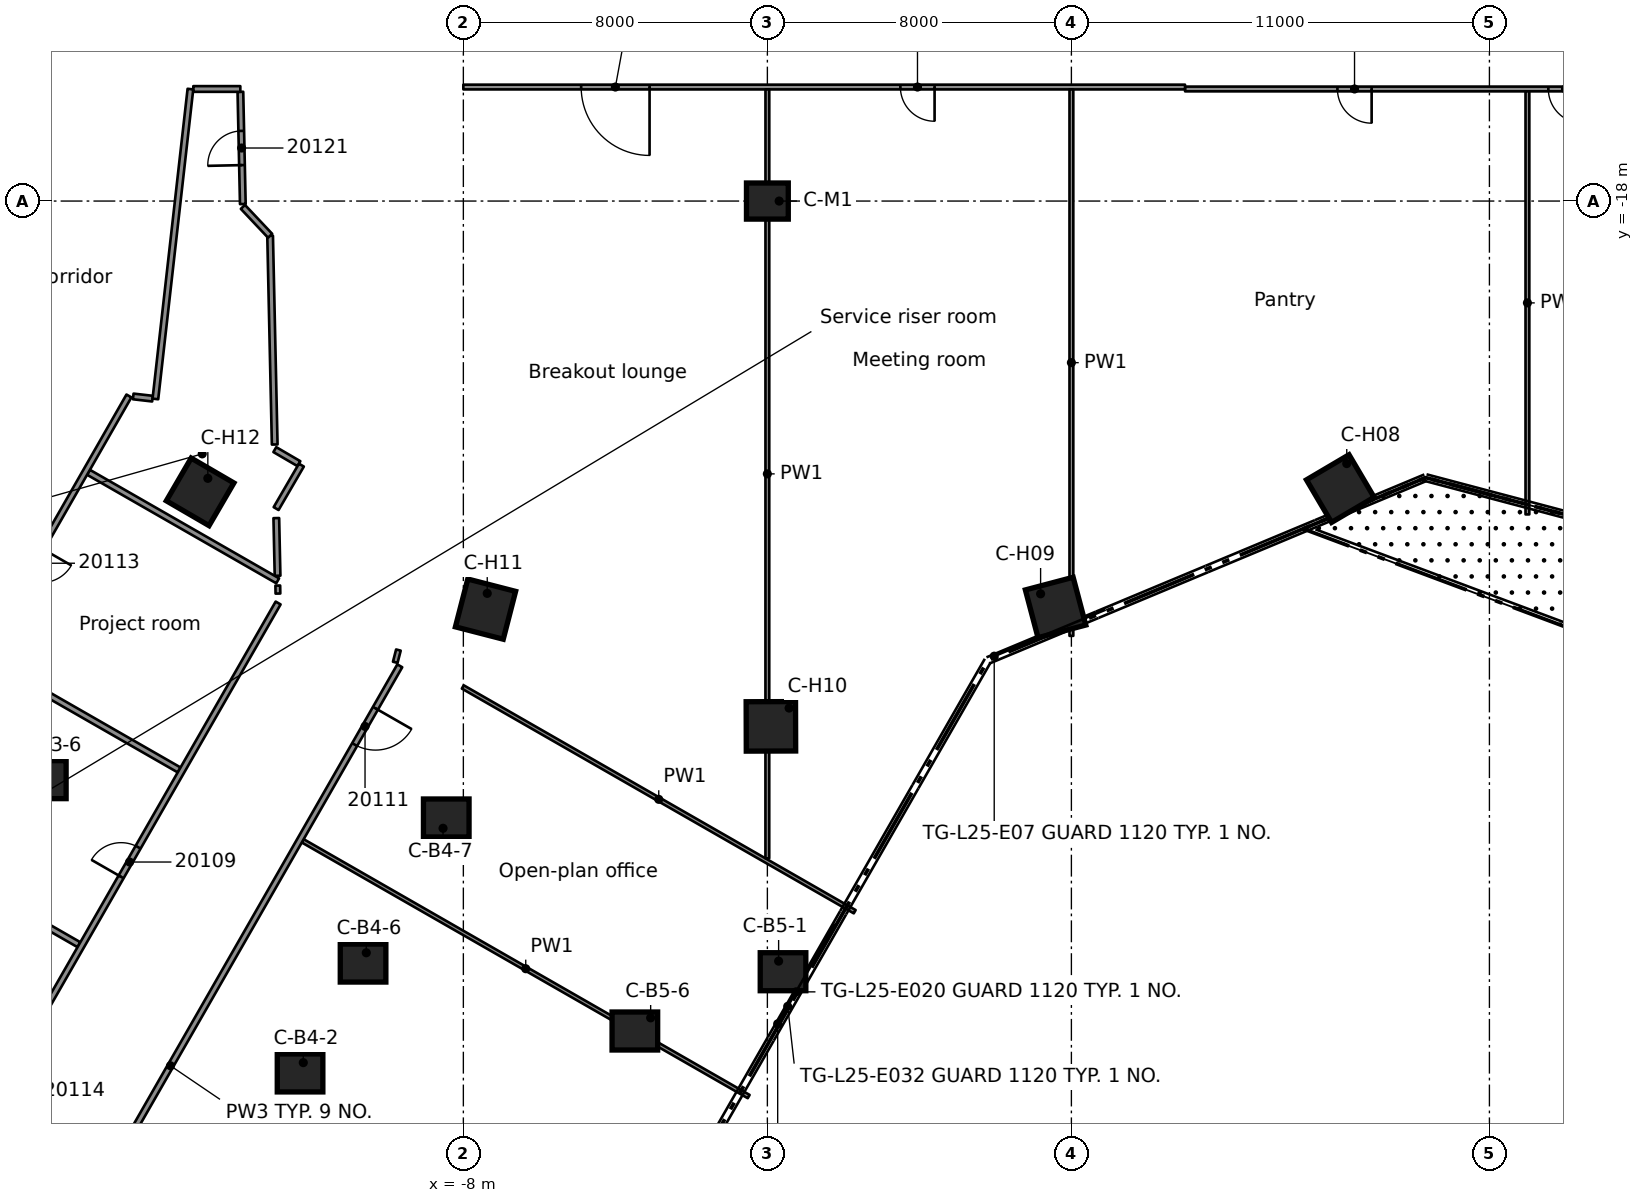
"""IFC4 building model, lengths in metres.
Left out: names, types, materials, properties, quantities, classifications, styles, units other than length and angle.
Written with IfcOpenShell. Run it as: python <this file> out.ifc"""

import sys

from ifc_helpers import new_model, si_unit, direction, frame, frame_2d, origin, origin_2d, place, context, subcontext, project, spatial, rectangle, extrude, element, fill, save


model = new_model("IFC4")
c1 = context("Model", 3, precision=1e-05, world=origin(), true_north=direction((0.0, 1.0)))
c2 = subcontext(c1, "Body", "Model", "MODEL_VIEW")
j1 = project(units=[si_unit("LENGTHUNIT", "METRE"), si_unit("PLANEANGLEUNIT", "RADIAN")], contexts=[c1])
p1 = place(None, origin())
s1 = spatial("IfcSite", under=j1, at=p1, CompositionType="ELEMENT")
p2 = place(p1, origin())
s2 = spatial("IfcBuilding", under=s1, at=p2, CompositionType="ELEMENT")
p3 = place(p2, frame((0.0, 0.0, 102.2)))
s3 = spatial("IfcBuildingStorey", under=s2, at=p3, CompositionType="ELEMENT", Elevation=102.2)
for number, where, z_axis, x_axis in (
    (1, (-19.053, -33.224, 0.0), (0.0, 0.0, 1.0), (1.0, 0.0, 0.0)),
    (2, (-12.297, -40.941, 0.0), (0.0, 0.0, 1.0), (1.0, 0.0, 0.0)),
    (3, (-10.639, -38.05, 0.0), (0.0, 0.0, 1.0), (1.0, 0.0, 0.0)),
    (4, (-8.45, -34.233, 0.0), (0.0, 0.0, 1.0), (1.0, 0.0, 0.0)),
    (5, (0.412, -38.278, 0.0), (0.0, 0.0, 1.0), (1.0, 0.0, 0.0)),
    (6, (-3.487, -39.838, 0.0), (0.0, 0.0, 1.0), (1.0, 0.0, 0.0)),
):
    element("IfcColumn", number, at=place(p3, frame(where, z_axis=z_axis, x_axis=x_axis)), inside=s3, PredefinedType="COLUMN", context=c2, shape_type="SweptSolid", body=[
        extrude(rectangle(XDim=1.2, YDim=1.0, at=origin_2d()), origin(), (0.0, 0.0, 1.0), 3.5),
    ])
for number, where, z_axis, x_axis in (
    (7, (15.076, -25.565, 0.0), (0.0, 0.0, 1.0), (0.508, -0.861, 0.0)),
    (8, (7.584, -28.694, 0.0), (0.0, 0.0, 1.0), (0.256, -0.967, 0.0)),
    (9, (0.093, -31.822, 0.0), (0.0, 0.0, 1.0), (0.003, -1.0, 0.0)),
    (10, (-7.417, -28.737, 0.0), (0.0, 0.0, 1.0), (-0.25, -0.968, 0.0)),
    (11, (-14.927, -25.652, 0.0), (0.0, 0.0, 1.0), (-0.503, -0.864, 0.0)),
):
    element("IfcColumn", number, at=place(p3, frame(where, z_axis=z_axis, x_axis=x_axis)), inside=s3, PredefinedType="COLUMN", context=c2, shape_type="SweptSolid", body=[
        extrude(rectangle(XDim=1.3, YDim=1.3, at=origin_2d()), origin(), (0.0, 0.0, 1.0), 3.5),
    ])
p4 = place(p3, frame((0.0, -18.0, 0.0), z_axis=(0.0, 0.0, 1.0), x_axis=(1.0, 0.0, 0.0)))
e12 = element("IfcColumn", 12, at=p4, inside=s3, PredefinedType="COLUMN", context=c2, shape_type="SweptSolid", body=[
    extrude(rectangle(XDim=1.1, YDim=0.95, at=origin_2d()), origin(), (0.0, 0.0, 1.0), 3.5),
])
p5 = place(p3, frame((-12.922, -26.342, 0.0), z_axis=(0.0, 0.0, 1.0), x_axis=(0.021884343994, -0.999760509066, 0.0)))
e13 = element("IfcWall", 13, at=p5, inside=s3, PredefinedType="PARTITIONING", context=c2, shape_type="SweptSolid", body=[
    extrude(rectangle(XDim=1.517, YDim=0.15, at=frame_2d((0.759, 0.0))), origin(), (0.0, 0.0, 1.0), 3.08),
])
p6 = place(p3, frame((-13.803, -18.079, 0.0), z_axis=(0.0, 0.0, 1.0), x_axis=(-0.021654973705, 0.999765503563, 0.0)))
e14 = element("IfcWall", 14, at=p6, inside=s3, PredefinedType="PARTITIONING", context=c2, shape_type="SweptSolid", body=[
    extrude(rectangle(XDim=2.954, YDim=0.15, at=frame_2d((1.477, 0.0))), origin(), (0.0, 0.0, 1.0), 3.08),
])
p7 = place(p6, frame((1.025, 0.0, 0.0)))
e15 = element("IfcOpeningElement", 15, at=p7, cuts=e14, PredefinedType="OPENING", context=c2, shape_type="SweptSolid", body=[
    extrude(rectangle(XDim=0.9, YDim=2.1, at=frame_2d((0.45, 1.05))), frame((0.0, 0.085, 0.0), z_axis=(0.0, -1.0, 0.0), x_axis=(1.0, 0.0, 0.0)), (0.0, 0.0, 1.0), 0.17),
])
p8 = place(p3, frame((-13.085, -18.913, 0.0), z_axis=(0.0, 0.0, 1.0), x_axis=(0.021995655044, -0.999758066314, 0.0)))
e16 = element("IfcWall", 16, at=p8, inside=s3, PredefinedType="PARTITIONING", context=c2, shape_type="SweptSolid", body=[
    extrude(rectangle(XDim=5.494, YDim=0.15, at=frame_2d((2.747, 0.0))), origin(), (0.0, 0.0, 1.0), 3.08),
])
p9 = place(p3, frame((-12.883, -28.117, 0.0), z_axis=(0.0, 0.0, 1.0), x_axis=(0.019672118342, -0.999806485156, 0.0)))
e17 = element("IfcWall", 17, at=p9, inside=s3, PredefinedType="PARTITIONING", context=c2, shape_type="SweptSolid", body=[
    extrude(rectangle(XDim=0.211, YDim=0.125, at=frame_2d((0.105, 0.0))), origin(), (0.0, 0.0, 1.0), 3.08),
])
p10 = place(p3, frame((-12.961, -24.54, 0.0), z_axis=(0.0, 0.0, 1.0), x_axis=(0.863766837374, -0.503891705283, 0.0)))
e18 = element("IfcWall", 18, at=p10, inside=s3, PredefinedType="PARTITIONING", context=c2, shape_type="SweptSolid", body=[
    extrude(rectangle(XDim=0.734, YDim=0.15, at=frame_2d((0.367, 0.0))), origin(), (0.0, 0.0, 1.0), 3.08),
])
p11 = place(p3, frame((-23.283, -34.602, 0.0), z_axis=(0.0, 0.0, 1.0), x_axis=(0.867394604178, -0.497620940719, 0.0)))
e19 = element("IfcWall", 19, at=p11, inside=s3, PredefinedType="PARTITIONING", context=c2, shape_type="SweptSolid", body=[
    extrude(rectangle(XDim=5.958, YDim=0.15, at=frame_2d((2.979, 0.0))), origin(), (0.0, 0.0, 1.0), 3.08),
])
p12 = place(p3, frame((-20.65, -30.003, 0.0), z_axis=(0.0, 0.0, 1.0), x_axis=(0.867468461176, -0.497492179703, 0.0)))
e20 = element("IfcWall", 20, at=p12, inside=s3, PredefinedType="PARTITIONING", context=c2, shape_type="SweptSolid", body=[
    extrude(rectangle(XDim=5.962, YDim=0.15, at=frame_2d((2.981, 0.0))), origin(), (0.0, 0.0, 1.0), 3.08),
])
p13 = place(p3, frame((-12.225, -34.835, 0.0), z_axis=(0.0, 0.0, 1.0), x_axis=(0.867497921586, -0.497440806573, 0.0)))
e21 = element("IfcWall", 21, at=p13, inside=s3, PredefinedType="PARTITIONING", context=c2, shape_type="SweptSolid", body=[
    extrude(rectangle(XDim=13.525, YDim=0.1, at=frame_2d((6.763, 0.0))), origin(), (0.0, 0.0, 1.0), 3.08),
])
p14 = place(p3, frame((-17.864, -25.137, 0.0), z_axis=(0.0, 0.0, 1.0), x_axis=(0.867461886369, -0.497503643904, 0.0)))
e22 = element("IfcWall", 22, at=p14, inside=s3, PredefinedType="PARTITIONING", context=c2, shape_type="SweptSolid", body=[
    extrude(rectangle(XDim=5.739, YDim=0.15, at=frame_2d((2.869, 0.0))), origin(), (0.0, 0.0, 1.0), 3.08),
])
p15 = place(p3, frame((-8.015, -30.785, 0.0), z_axis=(0.0, 0.0, 1.0), x_axis=(0.867483873935, -0.497465303778, 0.0)))
e23 = element("IfcWall", 23, at=p15, inside=s3, PredefinedType="PARTITIONING", context=c2, shape_type="SweptSolid", body=[
    extrude(rectangle(XDim=11.888, YDim=0.1, at=frame_2d((5.944, 0.0))), origin(), (0.0, 0.0, 1.0), 3.08),
])
p16 = place(p3, frame((-16.687, -23.141, 0.0), z_axis=(0.0, 0.0, 1.0), x_axis=(0.993552701249, -0.113371203754, 0.0)))
e24 = element("IfcWall", 24, at=p16, inside=s3, PredefinedType="PARTITIONING", context=c2, shape_type="SweptSolid", body=[
    extrude(rectangle(XDim=0.51, YDim=0.15, at=frame_2d((0.255, 0.0))), origin(), (0.0, 0.0, 1.0), 3.08),
])
p17 = place(p3, frame((-15.106, -15.051, 0.0), z_axis=(0.0, 0.0, 1.0), x_axis=(1.0, 0.0, 0.0)))
e25 = element("IfcWall", 25, at=p17, inside=s3, PredefinedType="PARTITIONING", context=c2, shape_type="SweptSolid", body=[
    extrude(rectangle(XDim=1.237, YDim=0.15, at=frame_2d((0.619, 0.0))), origin(), (0.0, 0.0, 1.0), 3.08),
])
p18 = place(p3, frame((21.988, -15.051, 0.0), z_axis=(0.0, 0.0, 1.0), x_axis=(-1.0, 0.0, 0.0)))
e26 = element("IfcWall", 26, at=p18, inside=s3, PredefinedType="PARTITIONING", context=c2, shape_type="SweptSolid", body=[
    extrude(rectangle(XDim=10.997, YDim=0.125, at=frame_2d((5.499, 0.0))), origin(), (0.0, 0.0, 1.0), 3.08),
])
p19 = place(p18, frame((6.087, 0.0, 0.0)))
e27 = element("IfcOpeningElement", 27, at=p19, cuts=e26, PredefinedType="OPENING", context=c2, shape_type="SweptSolid", body=[
    extrude(rectangle(XDim=0.9, YDim=2.1, at=frame_2d((0.45, 1.05))), frame((0.0, 0.073, 0.0), z_axis=(0.0, -1.0, 0.0), x_axis=(1.0, 0.0, 0.0)), (0.0, 0.0, 1.0), 0.145),
])
p20 = place(p18, frame((0.538, 0.0, 0.0)))
e28 = element("IfcOpeningElement", 28, at=p20, cuts=e26, PredefinedType="OPENING", context=c2, shape_type="SweptSolid", body=[
    extrude(rectangle(XDim=0.9, YDim=2.1, at=frame_2d((0.45, 1.05))), frame((0.0, 0.073, 0.0), z_axis=(0.0, -1.0, 0.0), x_axis=(1.0, 0.0, 0.0)), (0.0, 0.0, 1.0), 0.145),
])
p21 = place(p3, frame((10.99, -15.0, 0.0), z_axis=(0.0, 0.0, 1.0), x_axis=(-1.0, 0.0, 0.0)))
e29 = element("IfcWall", 29, at=p21, inside=s3, PredefinedType="PARTITIONING", context=c2, shape_type="SweptSolid", body=[
    extrude(rectangle(XDim=18.99, YDim=0.125, at=frame_2d((9.495, 0.0))), origin(), (0.0, 0.0, 1.0), 3.08),
])
p22 = place(p21, frame((14.09, 0.0, 0.0)))
e30 = element("IfcOpeningElement", 30, at=p22, cuts=e29, PredefinedType="OPENING", context=c2, shape_type="SweptSolid", body=[
    extrude(rectangle(XDim=1.8, YDim=2.1, at=frame_2d((0.9, 1.05))), frame((0.0, 0.073, 0.0), z_axis=(0.0, -1.0, 0.0), x_axis=(1.0, 0.0, 0.0)), (0.0, 0.0, 1.0), 0.145),
])
p23 = place(p21, frame((6.59, 0.0, 0.0)))
e31 = element("IfcOpeningElement", 31, at=p23, cuts=e29, PredefinedType="OPENING", context=c2, shape_type="SweptSolid", body=[
    extrude(rectangle(XDim=0.9, YDim=2.1, at=frame_2d((0.45, 1.05))), frame((0.0, 0.073, 0.0), z_axis=(0.0, -1.0, 0.0), x_axis=(1.0, 0.0, 0.0)), (0.0, 0.0, 1.0), 0.145),
])
p24 = place(p3, frame((-13.801, -18.154, 0.0), z_axis=(0.0, 0.0, 1.0), x_axis=(0.686218091213, -0.727395855977, 0.0)))
e32 = element("IfcWall", 32, at=p24, inside=s3, PredefinedType="PARTITIONING", context=c2, shape_type="SweptSolid", body=[
    extrude(rectangle(XDim=1.043, YDim=0.15, at=frame_2d((0.522, 0.0))), origin(), (0.0, 0.0, 1.0), 3.08),
])
p25 = place(p3, frame((-12.927, -26.092, 0.0), z_axis=(0.0, 0.0, 1.0), x_axis=(0.502562736504, 0.864540742752, 0.0)))
e33 = element("IfcWall", 33, at=p25, inside=s3, PredefinedType="PARTITIONING", context=c2, shape_type="SweptSolid", body=[
    extrude(rectangle(XDim=1.323, YDim=0.15, at=frame_2d((0.662, 0.0))), origin(), (0.0, 0.0, 1.0), 3.08),
])
p26 = place(p3, frame((-9.673, -30.229, 0.0), z_axis=(0.0, 0.0, 1.0), x_axis=(-0.497332712809, -0.867559895783, 0.0)))
e34 = element("IfcWall", 34, at=p26, inside=s3, PredefinedType="PARTITIONING", context=c2, shape_type="SweptSolid", body=[
    extrude(rectangle(XDim=24.261, YDim=0.15, at=frame_2d((12.131, 0.0))), origin(), (0.0, 0.0, 1.0), 3.08),
])
p27 = place(p26, frame((1.288, 0.0, 0.0)))
e35 = element("IfcOpeningElement", 35, at=p27, cuts=e34, PredefinedType="OPENING", context=c2, shape_type="SweptSolid", body=[
    extrude(rectangle(XDim=1.1, YDim=2.1, at=frame_2d((0.55, 1.05))), frame((0.0, 0.085, 0.0), z_axis=(0.0, -1.0, 0.0), x_axis=(1.0, 0.0, 0.0)), (0.0, 0.0, 1.0), 0.17),
])
p28 = place(p26, frame((14.415, 0.0, 0.0)))
e36 = element("IfcOpeningElement", 36, at=p28, cuts=e34, PredefinedType="OPENING", context=c2, shape_type="SweptSolid", body=[
    extrude(rectangle(XDim=0.9, YDim=2.1, at=frame_2d((0.45, 1.05))), frame((0.0, 0.085, 0.0), z_axis=(0.0, -1.0, 0.0), x_axis=(1.0, 0.0, 0.0)), (0.0, 0.0, 1.0), 0.17),
])
p29 = place(p3, frame((-23.323, -46.799, 0.0), z_axis=(0.0, 0.0, 1.0), x_axis=(0.497421315986, 0.867509097591, 0.0)))
e37 = element("IfcWall", 37, at=p29, inside=s3, PredefinedType="PARTITIONING", context=c2, shape_type="SweptSolid", body=[
    extrude(rectangle(XDim=21.006, YDim=0.15, at=frame_2d((10.503, 0.0))), origin(), (0.0, 0.0, 1.0), 3.08),
])
p30 = place(p29, frame((12.7, 0.0, 0.0)))
e38 = element("IfcOpeningElement", 38, at=p30, cuts=e37, PredefinedType="OPENING", context=c2, shape_type="SweptSolid", body=[
    extrude(rectangle(XDim=0.9, YDim=2.1, at=frame_2d((0.45, 1.05))), frame((0.0, 0.085, 0.0), z_axis=(0.0, -1.0, 0.0), x_axis=(1.0, 0.0, 0.0)), (0.0, 0.0, 1.0), 0.17),
])
p31 = place(p29, frame((5.75, 0.0, 0.0)))
e39 = element("IfcOpeningElement", 39, at=p31, cuts=e37, PredefinedType="OPENING", context=c2, shape_type="SweptSolid", body=[
    extrude(rectangle(XDim=0.9, YDim=2.1, at=frame_2d((0.45, 1.05))), frame((0.0, 0.085, 0.0), z_axis=(0.0, -1.0, 0.0), x_axis=(1.0, 0.0, 0.0)), (0.0, 0.0, 1.0), 0.17),
])
p32 = place(p3, frame((-16.8, -23.128, 0.0), z_axis=(0.0, 0.0, 1.0), x_axis=(-0.496846554385, -0.867838407422, 0.0)))
e40 = element("IfcWall", 40, at=p32, inside=s3, PredefinedType="PARTITIONING", context=c2, shape_type="SweptSolid", body=[
    extrude(rectangle(XDim=21.88, YDim=0.15, at=frame_2d((10.94, 0.0))), origin(), (0.0, 0.0, 1.0), 3.08),
])
p33 = place(p32, frame((4.622, 0.0, 0.0)))
e41 = element("IfcOpeningElement", 41, at=p33, cuts=e40, PredefinedType="OPENING", context=c2, shape_type="SweptSolid", body=[
    extrude(rectangle(XDim=0.9, YDim=2.1, at=frame_2d((0.45, 1.05))), frame((0.0, 0.085, 0.0), z_axis=(0.0, -1.0, 0.0), x_axis=(1.0, 0.0, 0.0)), (0.0, 0.0, 1.0), 0.17),
])
p34 = place(p3, frame((-9.792, -30.137, 0.0), z_axis=(0.0, 0.0, 1.0), x_axis=(0.248903704167, 0.968528237096, 0.0)))
e42 = element("IfcWall", 42, at=p34, inside=s3, PredefinedType="PARTITIONING", context=c2, shape_type="SweptSolid", body=[
    extrude(rectangle(XDim=0.333, YDim=0.125, at=frame_2d((0.167, 0.0))), origin(), (0.0, 0.0, 1.0), 3.08),
])
p35 = place(p3, frame((-16.104, -23.207, 0.0), z_axis=(0.0, 0.0, 1.0), x_axis=(0.112384250222, 0.993664822917, 0.0)))
e43 = element("IfcWall", 43, at=p35, inside=s3, PredefinedType="PARTITIONING", context=c2, shape_type="SweptSolid", body=[
    extrude(rectangle(XDim=8.205, YDim=0.15, at=frame_2d((4.103, 0.0))), origin(), (0.0, 0.0, 1.0), 3.08),
])
p36 = place(p3, frame((20.0, -26.245, 0.0), z_axis=(0.0, 0.0, 1.0), x_axis=(0.0, 1.0, 0.0)))
e44 = element("IfcWall", 44, at=p36, inside=s3, PredefinedType="PARTITIONING", context=c2, shape_type="SweptSolid", body=[
    extrude(rectangle(XDim=11.131, YDim=0.1, at=frame_2d((5.565, 0.0))), origin(), (0.0, 0.0, 1.0), 3.08),
])
p37 = place(p3, frame((8.0, -29.441, 0.0), z_axis=(0.0, 0.0, 1.0), x_axis=(0.0, 1.0, 0.0)))
e45 = element("IfcWall", 45, at=p37, inside=s3, PredefinedType="PARTITIONING", context=c2, shape_type="SweptSolid", body=[
    extrude(rectangle(XDim=14.378, YDim=0.1, at=frame_2d((7.189, 0.0))), origin(), (0.0, 0.0, 1.0), 3.08),
])
p38 = place(p3, frame((-0.001, -35.295, 0.0), z_axis=(0.0, 0.0, 1.0), x_axis=(4.8266042e-05, 0.999999998835, 0.0)))
e46 = element("IfcWall", 46, at=p38, inside=s3, PredefinedType="PARTITIONING", context=c2, shape_type="SweptSolid", body=[
    extrude(rectangle(XDim=20.233, YDim=0.1, at=frame_2d((10.116, 0.0))), origin(), (0.0, 0.0, 1.0), 3.08),
])
p39 = place(p30, origin())
e47 = element("IfcDoor", 47, at=p39, inside=s3, OperationType="SINGLE_SWING_RIGHT", PredefinedType="DOOR", context=c2, shape_type="SweptSolid", body=[
    extrude(rectangle(XDim=0.9, YDim=2.1, at=frame_2d((0.45, 1.05))), frame((0.0, 0.025, 0.0), z_axis=(0.0, -1.0, 0.0), x_axis=(1.0, 0.0, 0.0)), (0.0, 0.0, 1.0), 0.05),
])
fill(e38, e47)
p40 = place(p27, origin())
e48 = element("IfcDoor", 48, at=p40, inside=s3, OperationType="SINGLE_SWING_LEFT", PredefinedType="DOOR", context=c2, shape_type="SweptSolid", body=[
    extrude(rectangle(XDim=1.1, YDim=2.1, at=frame_2d((0.55, 1.05))), frame((0.0, 0.025, 0.0), z_axis=(0.0, -1.0, 0.0), x_axis=(1.0, 0.0, 0.0)), (0.0, 0.0, 1.0), 0.05),
])
fill(e35, e48)
p41 = place(p7, origin())
e49 = element("IfcDoor", 49, at=p41, inside=s3, OperationType="SINGLE_SWING_LEFT", PredefinedType="DOOR", context=c2, shape_type="SweptSolid", body=[
    extrude(rectangle(XDim=0.9, YDim=2.1, at=frame_2d((0.45, 1.05))), frame((0.0, 0.025, 0.0), z_axis=(0.0, -1.0, 0.0), x_axis=(1.0, 0.0, 0.0)), (0.0, 0.0, 1.0), 0.05),
])
fill(e15, e49)
p42 = place(p22, origin())
e50 = element("IfcDoor", 50, at=p42, inside=s3, OperationType="DOUBLE_DOOR_SINGLE_SWING", PredefinedType="DOOR", context=c2, shape_type="SweptSolid", body=[
    extrude(rectangle(XDim=1.8, YDim=2.1, at=frame_2d((0.9, 1.05))), frame((0.0, 0.025, 0.0), z_axis=(0.0, -1.0, 0.0), x_axis=(1.0, 0.0, 0.0)), (0.0, 0.0, 1.0), 0.05),
])
fill(e30, e50)
p43 = place(p23, origin())
e51 = element("IfcDoor", 51, at=p43, inside=s3, OperationType="SINGLE_SWING_LEFT", PredefinedType="DOOR", context=c2, shape_type="SweptSolid", body=[
    extrude(rectangle(XDim=0.9, YDim=2.1, at=frame_2d((0.45, 1.05))), frame((0.0, 0.025, 0.0), z_axis=(0.0, -1.0, 0.0), x_axis=(1.0, 0.0, 0.0)), (0.0, 0.0, 1.0), 0.05),
])
fill(e31, e51)
p44 = place(p19, origin())
e52 = element("IfcDoor", 52, at=p44, inside=s3, OperationType="SINGLE_SWING_RIGHT", PredefinedType="DOOR", context=c2, shape_type="SweptSolid", body=[
    extrude(rectangle(XDim=0.9, YDim=2.1, at=frame_2d((0.45, 1.05))), frame((0.0, 0.025, 0.0), z_axis=(0.0, -1.0, 0.0), x_axis=(1.0, 0.0, 0.0)), (0.0, 0.0, 1.0), 0.05),
])
fill(e27, e52)
p45 = place(p20, origin())
e53 = element("IfcDoor", 53, at=p45, inside=s3, OperationType="SINGLE_SWING_LEFT", PredefinedType="DOOR", context=c2, shape_type="SweptSolid", body=[
    extrude(rectangle(XDim=0.9, YDim=2.1, at=frame_2d((0.45, 1.05))), frame((0.0, 0.025, 0.0), z_axis=(0.0, -1.0, 0.0), x_axis=(1.0, 0.0, 0.0)), (0.0, 0.0, 1.0), 0.05),
])
fill(e28, e53)
save(model, sys.argv[1])
